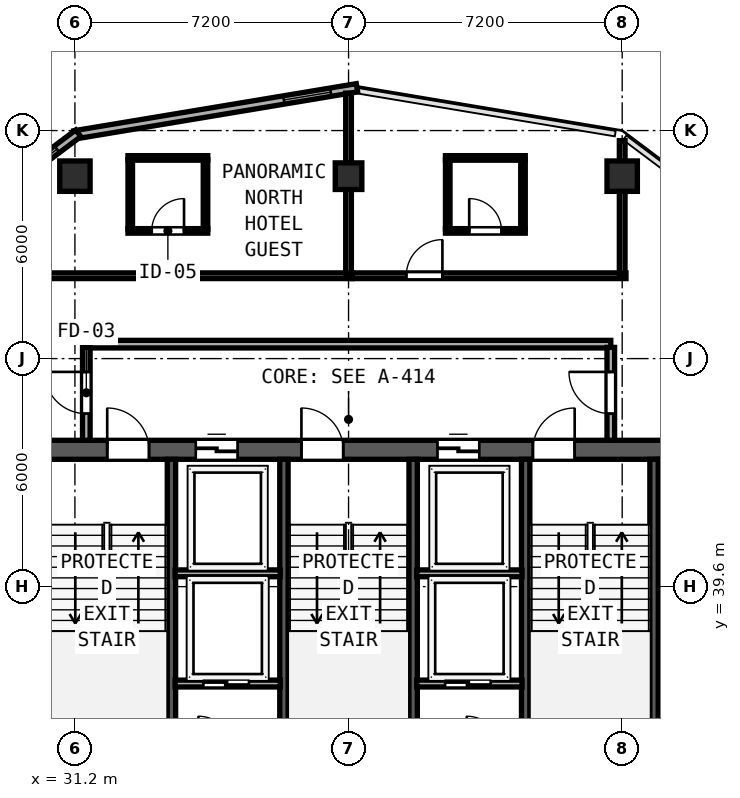
"""IFC4 building model, lengths in metres.
Left out: names, types, materials, properties, quantities, classifications, styles, units other than length and angle.
Written with IfcOpenShell. Run it as: python <this file> out.ifc"""

import sys

from ifc_helpers import new_model, si_unit, direction, frame, frame_2d, origin, origin_2d, place, context, subcontext, project, spatial, rectangle, hollow_rectangle, extrude, element, fill, save


model = new_model("IFC4")
c1 = context("Model", 3, precision=1e-05, world=origin(), true_north=direction((0.0, 1.0)))
c2 = subcontext(c1, "Body", "Model", "MODEL_VIEW")
j1 = project(units=[si_unit("LENGTHUNIT", "METRE"), si_unit("PLANEANGLEUNIT", "RADIAN")], contexts=[c1])
p1 = place(None, origin())
s1 = spatial("IfcSite", under=j1, at=p1, CompositionType="ELEMENT")
p2 = place(p1, origin())
s2 = spatial("IfcBuilding", under=s1, at=p2, CompositionType="ELEMENT")
p3 = place(p2, frame((0.0, 0.0, 269.85)))
s3 = spatial("IfcBuildingStorey", under=s2, at=p3, CompositionType="ELEMENT", Elevation=269.85)
p4 = place(p3, frame((29.75, 43.2, 0.0), z_axis=(0.0, 0.0, 1.0), x_axis=(1.0, 0.0, 0.0)))
e1 = element("IfcWall", 1, at=p4, inside=s3, PredefinedType="SHEAR", context=c2, shape_type="SweptSolid", body=[
    extrude(rectangle(XDim=17.3, YDim=0.5, at=frame_2d((8.65, 0.0))), origin(), (0.0, 0.0, 1.0), 3.67),
])
p5 = place(p4, frame((2.3, 0.0, 0.0)))
e2 = element("IfcOpeningElement", 2, at=p5, cuts=e1, PredefinedType="OPENING", context=c2, shape_type="SweptSolid", body=[
    extrude(rectangle(XDim=1.1, YDim=2.15, at=frame_2d((0.55, 1.075))), frame((0.0, 0.26, 0.0), z_axis=(0.0, -1.0, 0.0), x_axis=(1.0, 0.0, 0.0)), (0.0, 0.0, 1.0), 0.52),
])
p6 = place(p4, frame((7.41, 0.0, 0.0)))
e3 = element("IfcOpeningElement", 3, at=p6, cuts=e1, PredefinedType="OPENING", context=c2, shape_type="SweptSolid", body=[
    extrude(rectangle(XDim=1.1, YDim=2.15, at=frame_2d((0.55, 1.075))), frame((0.0, 0.26, 0.0), z_axis=(0.0, -1.0, 0.0), x_axis=(1.0, 0.0, 0.0)), (0.0, 0.0, 1.0), 0.52),
])
p7 = place(p4, frame((13.5, 0.0, 0.0)))
e4 = element("IfcOpeningElement", 4, at=p7, cuts=e1, PredefinedType="OPENING", context=c2, shape_type="SweptSolid", body=[
    extrude(rectangle(XDim=1.1, YDim=2.15, at=frame_2d((0.55, 1.075))), frame((0.0, 0.26, 0.0), z_axis=(0.0, -1.0, 0.0), x_axis=(1.0, 0.0, 0.0)), (0.0, 0.0, 1.0), 0.52),
])
p8 = place(p4, frame((4.63, 0.0, 0.0)))
e5 = element("IfcOpeningElement", 5, at=p8, cuts=e1, PredefinedType="OPENING", context=c2, shape_type="SweptSolid", body=[
    extrude(rectangle(XDim=1.1, YDim=2.2, at=frame_2d((0.55, 1.1))), frame((0.0, 0.26, 0.0), z_axis=(0.0, -1.0, 0.0), x_axis=(1.0, 0.0, 0.0)), (0.0, 0.0, 1.0), 0.52),
])
p9 = place(p4, frame((10.99, 0.0, 0.0)))
e6 = element("IfcOpeningElement", 6, at=p9, cuts=e1, PredefinedType="OPENING", context=c2, shape_type="SweptSolid", body=[
    extrude(rectangle(XDim=1.1, YDim=2.2, at=frame_2d((0.55, 1.1))), frame((0.0, 0.26, 0.0), z_axis=(0.0, -1.0, 0.0), x_axis=(1.0, 0.0, 0.0)), (0.0, 0.0, 1.0), 0.52),
])
p10 = place(p3, frame((46.8, 32.8, 0.0), z_axis=(0.0, 0.0, 1.0), x_axis=(0.0, 1.0, 0.0)))
e7 = element("IfcWall", 7, at=p10, inside=s3, PredefinedType="SHEAR", context=c2, shape_type="SweptSolid", body=[
    extrude(rectangle(XDim=10.15, YDim=0.5, at=frame_2d((5.075, 0.0))), origin(), (0.0, 0.0, 1.0), 3.67),
])
for number, where, z_axis, x_axis in (
    (8, (33.74, 35.39, 0.0), (0.0, 0.0, 1.0), (0.0, 1.0, 0.0)),
    (9, (36.7, 35.39, 0.0), (0.0, 0.0, 1.0), (0.0, 1.0, 0.0)),
    (10, (40.1, 35.39, 0.0), (0.0, 0.0, 1.0), (0.0, 1.0, 0.0)),
    (11, (43.06, 35.39, 0.0), (0.0, 0.0, 1.0), (0.0, 1.0, 0.0)),
    (12, (46.438, 35.39, 0.0), (0.0, 0.0, 1.0), (0.0, 1.0, 0.0)),
):
    element("IfcWall", number, at=place(p3, frame(where, z_axis=z_axis, x_axis=x_axis)), inside=s3, PredefinedType="SHEAR", context=c2, shape_type="SweptSolid", body=[
        extrude(rectangle(XDim=7.56, YDim=0.22, at=frame_2d((3.78, 0.0))), origin(), (0.0, 0.0, 1.0), 3.67),
    ])
for number, where, z_axis, x_axis in (
    (13, (31.2, 50.4, 0.0), (0.0, 0.0, 1.0), (1.0, 0.0, 0.0)),
    (14, (45.6, 50.4, 0.0), (0.0, 0.0, 1.0), (1.0, 0.0, 0.0)),
):
    element("IfcColumn", number, at=place(p3, frame(where, z_axis=z_axis, x_axis=x_axis)), inside=s3, PredefinedType="COLUMN", context=c2, shape_type="SweptSolid", body=[
        extrude(hollow_rectangle(XDim=0.8, YDim=0.8, WallThickness=0.03, at=origin_2d()), origin(), (0.0, 0.0, 1.0), 3.85),
    ])
p11 = place(p3, frame((38.4, 50.4, 0.0), z_axis=(0.0, 0.0, 1.0), x_axis=(1.0, 0.0, 0.0)))
e15 = element("IfcColumn", 15, at=p11, inside=s3, PredefinedType="COLUMN", context=c2, shape_type="SweptSolid", body=[
    extrude(hollow_rectangle(XDim=0.7, YDim=0.7, WallThickness=0.026, at=origin_2d()), origin(), (0.0, 0.0, 1.0), 3.85),
])
p12 = place(p3, frame((38.622, 52.726, 0.0), z_axis=(0.0, 0.0, 1.0), x_axis=(-0.986390420428, -0.164420006349, 0.0)))
e16 = element("IfcWall", 16, at=p12, inside=s3, PredefinedType="SOLIDWALL", context=c2, shape_type="SweptSolid", body=[
    extrude(rectangle(XDim=7.534, YDim=0.22, at=frame_2d((3.767, 0.0))), origin(), (0.0, 0.0, 1.0), 3.67),
])
p13 = place(p12, frame((0.7, 0.0, 0.85)))
e17 = element("IfcOpeningElement", 17, at=p13, cuts=e16, PredefinedType="OPENING", context=c2, shape_type="SweptSolid", body=[
    extrude(rectangle(XDim=1.25, YDim=1.95, at=frame_2d((0.625, 0.975))), frame((0.0, 0.12, 0.0), z_axis=(0.0, -1.0, 0.0), x_axis=(1.0, 0.0, 0.0)), (0.0, 0.0, 1.0), 0.24),
])
p14 = place(p3, frame((31.289, 51.529, 0.0), z_axis=(0.0, 0.0, 1.0), x_axis=(-0.800014580093, -0.599980559383, 0.0)))
e18 = element("IfcWall", 18, at=p14, inside=s3, PredefinedType="SOLIDWALL", context=c2, shape_type="SweptSolid", body=[
    extrude(rectangle(XDim=6.028, YDim=0.22, at=frame_2d((3.014, 0.0))), origin(), (0.0, 0.0, 1.0), 3.67),
])
p15 = place(p14, frame((0.7, 0.0, 0.85)))
e19 = element("IfcOpeningElement", 19, at=p15, cuts=e18, PredefinedType="OPENING", context=c2, shape_type="SweptSolid", body=[
    extrude(rectangle(XDim=1.25, YDim=1.95, at=frame_2d((0.625, 0.975))), frame((0.0, 0.12, 0.0), z_axis=(0.0, -1.0, 0.0), x_axis=(1.0, 0.0, 0.0)), (0.0, 0.0, 1.0), 0.24),
])
p16 = place(p3, frame((31.5, 45.98, 0.0), z_axis=(0.0, 0.0, 1.0), x_axis=(1.0, 0.0, 0.0)))
e20 = element("IfcWall", 20, at=p16, inside=s3, PredefinedType="SOLIDWALL", context=c2, shape_type="SweptSolid", body=[
    extrude(rectangle(XDim=13.8, YDim=0.2, at=frame_2d((6.9, 0.0))), origin(), (0.0, 0.0, 1.0), 3.67),
])
p17 = place(p3, frame((31.5, 43.45, 0.0), z_axis=(0.0, 0.0, 1.0), x_axis=(0.0, 1.0, 0.0)))
e21 = element("IfcWall", 21, at=p17, inside=s3, PredefinedType="SOLIDWALL", context=c2, shape_type="SweptSolid", body=[
    extrude(rectangle(XDim=2.445, YDim=0.2, at=frame_2d((1.223, 0.0))), origin(), (0.0, 0.0, 1.0), 3.67),
])
p18 = place(p17, frame((1.8, 0.0, 0.0), z_axis=(0.0, 0.0, 1.0), x_axis=(-1.0, 0.0, 0.0)))
e22 = element("IfcOpeningElement", 22, at=p18, cuts=e21, PredefinedType="OPENING", context=c2, shape_type="SweptSolid", body=[
    extrude(rectangle(XDim=1.1, YDim=2.15, at=frame_2d((0.55, 1.075))), frame((0.0, 0.11, 0.0), z_axis=(0.0, -1.0, 0.0), x_axis=(1.0, 0.0, 0.0)), (0.0, 0.0, 1.0), 0.22),
])
p19 = place(p3, frame((45.3, 43.45, 0.0), z_axis=(0.0, 0.0, 1.0), x_axis=(0.0, 1.0, 0.0)))
e23 = element("IfcWall", 23, at=p19, inside=s3, PredefinedType="SOLIDWALL", context=c2, shape_type="SweptSolid", body=[
    extrude(rectangle(XDim=2.445, YDim=0.2, at=frame_2d((1.223, 0.0))), origin(), (0.0, 0.0, 1.0), 3.67),
])
p20 = place(p19, frame((0.7, 0.0, 0.0)))
e24 = element("IfcOpeningElement", 24, at=p20, cuts=e23, PredefinedType="OPENING", context=c2, shape_type="SweptSolid", body=[
    extrude(rectangle(XDim=1.1, YDim=2.15, at=frame_2d((0.55, 1.075))), frame((0.0, 0.11, 0.0), z_axis=(0.0, -1.0, 0.0), x_axis=(1.0, 0.0, 0.0)), (0.0, 0.0, 1.0), 0.22),
])
for number, where, z_axis, x_axis in (
    (25, (33.835, 39.95, 0.0), (0.0, 0.0, 1.0), (1.0, 0.0, 0.0)),
    (26, (40.195, 39.95, 0.0), (0.0, 0.0, 1.0), (1.0, 0.0, 0.0)),
):
    element("IfcWall", number, at=place(p3, frame(where, z_axis=z_axis, x_axis=x_axis)), inside=s3, PredefinedType="SOLIDWALL", context=c2, shape_type="SweptSolid", body=[
        extrude(rectangle(XDim=2.77, YDim=0.18, at=frame_2d((1.385, 0.0))), origin(), (0.0, 0.0, 1.0), 3.67),
    ])
p21 = place(p3, frame((33.835, 37.05, 0.0), z_axis=(0.0, 0.0, 1.0), x_axis=(1.0, 0.0, 0.0)))
e27 = element("IfcWall", 27, at=p21, inside=s3, PredefinedType="SOLIDWALL", context=c2, shape_type="SweptSolid", body=[
    extrude(rectangle(XDim=2.77, YDim=0.18, at=frame_2d((1.385, 0.0))), origin(), (0.0, 0.0, 1.0), 3.67),
])
p22 = place(p21, frame((1.945, 0.0, 0.0), z_axis=(0.0, 0.0, 1.0), x_axis=(-1.0, 0.0, 0.0)))
e28 = element("IfcOpeningElement", 28, at=p22, cuts=e27, PredefinedType="OPENING", context=c2, shape_type="SweptSolid", body=[
    extrude(rectangle(XDim=1.2, YDim=2.2, at=frame_2d((0.6, 1.1))), frame((0.0, 0.1, 0.0), z_axis=(0.0, -1.0, 0.0), x_axis=(1.0, 0.0, 0.0)), (0.0, 0.0, 1.0), 0.2),
])
p23 = place(p3, frame((40.195, 37.05, 0.0), z_axis=(0.0, 0.0, 1.0), x_axis=(1.0, 0.0, 0.0)))
e29 = element("IfcWall", 29, at=p23, inside=s3, PredefinedType="SOLIDWALL", context=c2, shape_type="SweptSolid", body=[
    extrude(rectangle(XDim=2.77, YDim=0.18, at=frame_2d((1.385, 0.0))), origin(), (0.0, 0.0, 1.0), 3.67),
])
p24 = place(p23, frame((1.945, 0.0, 0.0), z_axis=(0.0, 0.0, 1.0), x_axis=(-1.0, 0.0, 0.0)))
e30 = element("IfcOpeningElement", 30, at=p24, cuts=e29, PredefinedType="OPENING", context=c2, shape_type="SweptSolid", body=[
    extrude(rectangle(XDim=1.2, YDim=2.2, at=frame_2d((0.6, 1.1))), frame((0.0, 0.1, 0.0), z_axis=(0.0, -1.0, 0.0), x_axis=(1.0, 0.0, 0.0)), (0.0, 0.0, 1.0), 0.2),
])
p25 = place(p3, frame((26.612, 47.78, 0.0), z_axis=(0.0, 0.0, 1.0), x_axis=(1.0, 0.0, 0.0)))
e31 = element("IfcWall", 31, at=p25, inside=s3, PredefinedType="PARTITIONING", context=c2, shape_type="SweptSolid", body=[
    extrude(rectangle(XDim=11.888, YDim=0.15, at=frame_2d((5.944, 0.0))), origin(), (0.0, 0.0, 1.0), 3.67),
])
p26 = place(p25, frame((1.42, 0.0, 0.0)))
e32 = element("IfcOpeningElement", 32, at=p26, cuts=e31, PredefinedType="OPENING", context=c2, shape_type="SweptSolid", body=[
    extrude(rectangle(XDim=0.95, YDim=2.15, at=frame_2d((0.475, 1.075))), frame((0.0, 0.085, 0.0), z_axis=(0.0, -1.0, 0.0), x_axis=(1.0, 0.0, 0.0)), (0.0, 0.0, 1.0), 0.17),
])
p27 = place(p3, frame((38.4, 47.84, 0.0), z_axis=(0.0, 0.0, 1.0), x_axis=(0.0, 1.0, 0.0)))
e33 = element("IfcWall", 33, at=p27, inside=s3, PredefinedType="PARTITIONING", context=c2, shape_type="SweptSolid", body=[
    extrude(rectangle(XDim=4.745, YDim=0.15, at=frame_2d((2.373, 0.0))), origin(), (0.0, 0.0, 1.0), 3.67),
])
p28 = place(p3, frame((32.596, 50.88, 0.0), z_axis=(0.0, 0.0, 1.0), x_axis=(1.0, 0.0, 0.0)))
e34 = element("IfcWall", 34, at=p28, inside=s3, PredefinedType="PARTITIONING", context=c2, shape_type="SweptSolid", body=[
    extrude(rectangle(XDim=2.1, YDim=0.12, at=frame_2d((1.05, 0.0))), origin(), (0.0, 0.0, 1.0), 3.67),
])
p29 = place(p3, frame((32.596, 48.96, 0.0), z_axis=(0.0, 0.0, 1.0), x_axis=(1.0, 0.0, 0.0)))
e35 = element("IfcWall", 35, at=p29, inside=s3, PredefinedType="PARTITIONING", context=c2, shape_type="SweptSolid", body=[
    extrude(rectangle(XDim=2.1, YDim=0.12, at=frame_2d((1.05, 0.0))), origin(), (0.0, 0.0, 1.0), 3.67),
])
p30 = place(p29, frame((0.625, 0.0, 0.0)))
e36 = element("IfcOpeningElement", 36, at=p30, cuts=e35, PredefinedType="OPENING", context=c2, shape_type="SweptSolid", body=[
    extrude(rectangle(XDim=0.85, YDim=2.1, at=frame_2d((0.425, 1.05))), frame((0.0, 0.07, 0.0), z_axis=(0.0, -1.0, 0.0), x_axis=(1.0, 0.0, 0.0)), (0.0, 0.0, 1.0), 0.14),
])
for number, where, z_axis, x_axis in (
    (37, (32.656, 49.005, 0.0), (0.0, 0.0, 1.0), (0.0, 1.0, 0.0)),
    (38, (34.636, 49.005, 0.0), (0.0, 0.0, 1.0), (0.0, 1.0, 0.0)),
):
    element("IfcWall", number, at=place(p3, frame(where, z_axis=z_axis, x_axis=x_axis)), inside=s3, PredefinedType="PARTITIONING", context=c2, shape_type="SweptSolid", body=[
        extrude(rectangle(XDim=1.83, YDim=0.12, at=frame_2d((0.915, 0.0))), origin(), (0.0, 0.0, 1.0), 3.67),
    ])
p31 = place(p3, frame((38.502, 47.78, 0.0), z_axis=(0.0, 0.0, 1.0), x_axis=(1.0, 0.0, 0.0)))
e39 = element("IfcWall", 39, at=p31, inside=s3, PredefinedType="PARTITIONING", context=c2, shape_type="SweptSolid", body=[
    extrude(rectangle(XDim=7.198, YDim=0.15, at=frame_2d((3.599, 0.0))), origin(), (0.0, 0.0, 1.0), 3.67),
])
p32 = place(p31, frame((1.417, 0.0, 0.0)))
e40 = element("IfcOpeningElement", 40, at=p32, cuts=e39, PredefinedType="OPENING", context=c2, shape_type="SweptSolid", body=[
    extrude(rectangle(XDim=0.95, YDim=2.15, at=frame_2d((0.475, 1.075))), frame((0.0, 0.085, 0.0), z_axis=(0.0, -1.0, 0.0), x_axis=(1.0, 0.0, 0.0)), (0.0, 0.0, 1.0), 0.17),
])
p33 = place(p3, frame((45.6, 47.84, 0.0), z_axis=(0.0, 0.0, 1.0), x_axis=(0.0, 1.0, 0.0)))
e41 = element("IfcWall", 41, at=p33, inside=s3, PredefinedType="PARTITIONING", context=c2, shape_type="SweptSolid", body=[
    extrude(rectangle(XDim=3.495, YDim=0.15, at=frame_2d((1.748, 0.0))), origin(), (0.0, 0.0, 1.0), 3.205),
])
p34 = place(p3, frame((40.95, 50.88, 0.0), z_axis=(0.0, 0.0, 1.0), x_axis=(1.0, 0.0, 0.0)))
e42 = element("IfcWall", 42, at=p34, inside=s3, PredefinedType="PARTITIONING", context=c2, shape_type="SweptSolid", body=[
    extrude(rectangle(XDim=2.1, YDim=0.12, at=frame_2d((1.05, 0.0))), origin(), (0.0, 0.0, 1.0), 3.67),
])
p35 = place(p3, frame((40.95, 48.96, 0.0), z_axis=(0.0, 0.0, 1.0), x_axis=(1.0, 0.0, 0.0)))
e43 = element("IfcWall", 43, at=p35, inside=s3, PredefinedType="PARTITIONING", context=c2, shape_type="SweptSolid", body=[
    extrude(rectangle(XDim=2.1, YDim=0.12, at=frame_2d((1.05, 0.0))), origin(), (0.0, 0.0, 1.0), 3.67),
])
p36 = place(p35, frame((0.625, 0.0, 0.0)))
e44 = element("IfcOpeningElement", 44, at=p36, cuts=e43, PredefinedType="OPENING", context=c2, shape_type="SweptSolid", body=[
    extrude(rectangle(XDim=0.85, YDim=2.1, at=frame_2d((0.425, 1.05))), frame((0.0, 0.07, 0.0), z_axis=(0.0, -1.0, 0.0), x_axis=(1.0, 0.0, 0.0)), (0.0, 0.0, 1.0), 0.14),
])
for number, where, z_axis, x_axis in (
    (45, (41.01, 49.005, 0.0), (0.0, 0.0, 1.0), (0.0, 1.0, 0.0)),
    (46, (42.99, 49.005, 0.0), (0.0, 0.0, 1.0), (0.0, 1.0, 0.0)),
):
    element("IfcWall", number, at=place(p3, frame(where, z_axis=z_axis, x_axis=x_axis)), inside=s3, PredefinedType="PARTITIONING", context=c2, shape_type="SweptSolid", body=[
        extrude(rectangle(XDim=1.83, YDim=0.12, at=frame_2d((0.915, 0.0))), origin(), (0.0, 0.0, 1.0), 3.67),
    ])
p37 = place(p13, origin())
e47 = element("IfcWindow", 47, at=p37, inside=s3, PartitioningType="SINGLE_PANEL", PredefinedType="WINDOW", context=c2, shape_type="SweptSolid", body=[
    extrude(rectangle(XDim=1.25, YDim=1.95, at=frame_2d((0.625, 0.975))), frame((0.0, 0.03, 0.0), z_axis=(0.0, -1.0, 0.0), x_axis=(1.0, 0.0, 0.0)), (0.0, 0.0, 1.0), 0.06),
])
fill(e17, e47)
p38 = place(p15, origin())
e48 = element("IfcWindow", 48, at=p38, inside=s3, PartitioningType="SINGLE_PANEL", PredefinedType="WINDOW", context=c2, shape_type="SweptSolid", body=[
    extrude(rectangle(XDim=1.25, YDim=1.95, at=frame_2d((0.625, 0.975))), frame((0.0, 0.03, 0.0), z_axis=(0.0, -1.0, 0.0), x_axis=(1.0, 0.0, 0.0)), (0.0, 0.0, 1.0), 0.06),
])
fill(e19, e48)
p39 = place(p5, origin())
e49 = element("IfcDoor", 49, at=p39, inside=s3, OperationType="SINGLE_SWING_LEFT", PredefinedType="DOOR", context=c2, shape_type="SweptSolid", body=[
    extrude(rectangle(XDim=1.1, YDim=2.15, at=frame_2d((0.55, 1.075))), frame((0.0, 0.185, 0.0), z_axis=(0.0, -1.0, 0.0), x_axis=(1.0, 0.0, 0.0)), (0.0, 0.0, 1.0), 0.05),
])
fill(e2, e49)
p40 = place(p6, origin())
e50 = element("IfcDoor", 50, at=p40, inside=s3, OperationType="SINGLE_SWING_LEFT", PredefinedType="DOOR", context=c2, shape_type="SweptSolid", body=[
    extrude(rectangle(XDim=1.1, YDim=2.15, at=frame_2d((0.55, 1.075))), frame((0.0, 0.185, 0.0), z_axis=(0.0, -1.0, 0.0), x_axis=(1.0, 0.0, 0.0)), (0.0, 0.0, 1.0), 0.05),
])
fill(e3, e50)
p41 = place(p7, origin())
e51 = element("IfcDoor", 51, at=p41, inside=s3, OperationType="SINGLE_SWING_RIGHT", PredefinedType="DOOR", context=c2, shape_type="SweptSolid", body=[
    extrude(rectangle(XDim=1.1, YDim=2.15, at=frame_2d((0.55, 1.075))), frame((0.0, 0.185, 0.0), z_axis=(0.0, -1.0, 0.0), x_axis=(1.0, 0.0, 0.0)), (0.0, 0.0, 1.0), 0.05),
])
fill(e4, e51)
p42 = place(p18, origin())
e52 = element("IfcDoor", 52, at=p42, inside=s3, OperationType="SINGLE_SWING_LEFT", PredefinedType="DOOR", context=c2, shape_type="SweptSolid", body=[
    extrude(rectangle(XDim=1.1, YDim=2.15, at=frame_2d((0.55, 1.075))), frame((0.0, 0.025, 0.0), z_axis=(0.0, -1.0, 0.0), x_axis=(1.0, 0.0, 0.0)), (0.0, 0.0, 1.0), 0.05),
])
fill(e22, e52)
p43 = place(p20, origin())
e53 = element("IfcDoor", 53, at=p43, inside=s3, OperationType="SINGLE_SWING_RIGHT", PredefinedType="DOOR", context=c2, shape_type="SweptSolid", body=[
    extrude(rectangle(XDim=1.1, YDim=2.15, at=frame_2d((0.55, 1.075))), frame((0.0, 0.025, 0.0), z_axis=(0.0, -1.0, 0.0), x_axis=(1.0, 0.0, 0.0)), (0.0, 0.0, 1.0), 0.05),
])
fill(e24, e53)
p44 = place(p8, origin())
e54 = element("IfcDoor", 54, at=p44, inside=s3, OperationType="SLIDING_TO_LEFT", PredefinedType="DOOR", context=c2, shape_type="SweptSolid", body=[
    extrude(rectangle(XDim=1.1, YDim=2.2, at=frame_2d((0.55, 1.1))), frame((0.0, 0.185, 0.0), z_axis=(0.0, -1.0, 0.0), x_axis=(1.0, 0.0, 0.0)), (0.0, 0.0, 1.0), 0.05),
])
fill(e5, e54)
p45 = place(p9, origin())
e55 = element("IfcDoor", 55, at=p45, inside=s3, OperationType="SLIDING_TO_LEFT", PredefinedType="DOOR", context=c2, shape_type="SweptSolid", body=[
    extrude(rectangle(XDim=1.1, YDim=2.2, at=frame_2d((0.55, 1.1))), frame((0.0, 0.185, 0.0), z_axis=(0.0, -1.0, 0.0), x_axis=(1.0, 0.0, 0.0)), (0.0, 0.0, 1.0), 0.05),
])
fill(e6, e55)
p46 = place(p22, origin())
e56 = element("IfcDoor", 56, at=p46, inside=s3, OperationType="SLIDING_TO_RIGHT", PredefinedType="DOOR", context=c2, shape_type="SweptSolid", body=[
    extrude(rectangle(XDim=1.2, YDim=2.2, at=frame_2d((0.6, 1.1))), frame((0.0, 0.025, 0.0), z_axis=(0.0, -1.0, 0.0), x_axis=(1.0, 0.0, 0.0)), (0.0, 0.0, 1.0), 0.05),
])
fill(e28, e56)
p47 = place(p24, origin())
e57 = element("IfcDoor", 57, at=p47, inside=s3, OperationType="SLIDING_TO_RIGHT", PredefinedType="DOOR", context=c2, shape_type="SweptSolid", body=[
    extrude(rectangle(XDim=1.2, YDim=2.2, at=frame_2d((0.6, 1.1))), frame((0.0, 0.025, 0.0), z_axis=(0.0, -1.0, 0.0), x_axis=(1.0, 0.0, 0.0)), (0.0, 0.0, 1.0), 0.05),
])
fill(e30, e57)
p48 = place(p30, origin())
e58 = element("IfcDoor", 58, at=p48, inside=s3, OperationType="SINGLE_SWING_RIGHT", PredefinedType="DOOR", context=c2, shape_type="SweptSolid", body=[
    extrude(rectangle(XDim=0.85, YDim=2.1, at=frame_2d((0.425, 1.05))), frame((0.0, 0.025, 0.0), z_axis=(0.0, -1.0, 0.0), x_axis=(1.0, 0.0, 0.0)), (0.0, 0.0, 1.0), 0.05),
])
fill(e36, e58)
p49 = place(p32, origin())
e59 = element("IfcDoor", 59, at=p49, inside=s3, OperationType="SINGLE_SWING_RIGHT", PredefinedType="DOOR", context=c2, shape_type="SweptSolid", body=[
    extrude(rectangle(XDim=0.95, YDim=2.15, at=frame_2d((0.475, 1.075))), frame((0.0, 0.025, 0.0), z_axis=(0.0, -1.0, 0.0), x_axis=(1.0, 0.0, 0.0)), (0.0, 0.0, 1.0), 0.05),
])
fill(e40, e59)
p50 = place(p36, origin())
e60 = element("IfcDoor", 60, at=p50, inside=s3, OperationType="SINGLE_SWING_LEFT", PredefinedType="DOOR", context=c2, shape_type="SweptSolid", body=[
    extrude(rectangle(XDim=0.85, YDim=2.1, at=frame_2d((0.425, 1.05))), frame((0.0, 0.025, 0.0), z_axis=(0.0, -1.0, 0.0), x_axis=(1.0, 0.0, 0.0)), (0.0, 0.0, 1.0), 0.05),
])
fill(e44, e60)
save(model, sys.argv[1])
